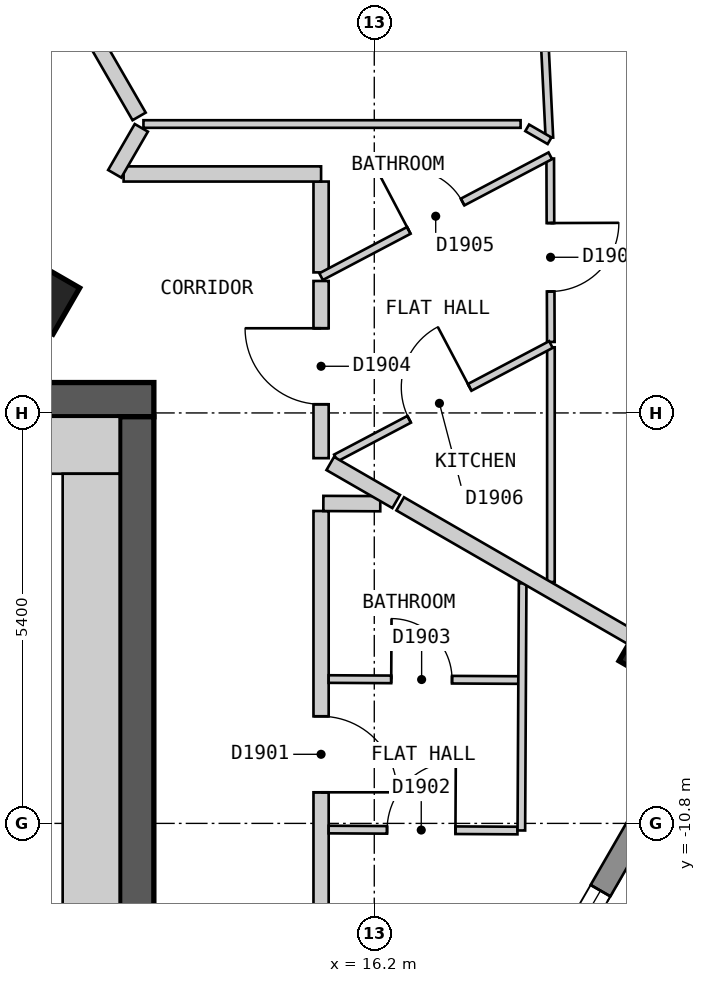
"""IFC4 building model, lengths in metres.
Left out: names, types, materials, properties, quantities, classifications, styles, units other than length and angle.
Written with IfcOpenShell. Run it as: python <this file> out.ifc"""

import sys

from ifc_helpers import new_model, si_unit, direction, frame, frame_2d, origin, origin_2d, place, context, subcontext, project, spatial, polyline, rectangle, outline, extrude, element, fill, save


model = new_model("IFC4")
c1 = context("Model", 3, precision=1e-05, world=origin(), true_north=direction((0.0, 1.0)))
c2 = subcontext(c1, "Body", "Model", "MODEL_VIEW")
j1 = project(units=[si_unit("LENGTHUNIT", "METRE"), si_unit("PLANEANGLEUNIT", "RADIAN")], contexts=[c1])
p1 = place(None, origin())
s1 = spatial("IfcSite", under=j1, at=p1, CompositionType="ELEMENT")
p2 = place(p1, origin())
s2 = spatial("IfcBuilding", under=s1, at=p2, CompositionType="ELEMENT")
p3 = place(p2, frame((0.0, 0.0, 226.8)))
s3 = spatial("IfcBuildingStorey", under=s2, at=p3, CompositionType="ELEMENT", Elevation=226.8)
for number, where, z_axis, x_axis in (
    (1, (19.899, -8.534, 0.0), (0.0, 0.0, 1.0), (0.5, 0.866, 0.0)),
    (2, (11.845, -3.884, 0.0), (0.0, 0.0, 1.0), (0.5, 0.866, 0.0)),
):
    element("IfcColumn", number, at=place(p3, frame(where, z_axis=z_axis, x_axis=x_axis)), inside=s3, PredefinedType="COLUMN", context=c2, shape_type="SweptSolid", body=[
        extrude(rectangle(XDim=0.7, YDim=0.7, at=origin_2d()), origin(), (0.0, 0.0, 1.0), 3.0),
    ])
p4 = place(p3, frame((-13.3, -5.225, 0.0), z_axis=(0.0, 0.0, 1.0), x_axis=(1.0, 0.0, 0.0)))
e3 = element("IfcWall", 3, at=p4, inside=s3, PredefinedType="SHEAR", context=c2, shape_type="SweptSolid", body=[
    extrude(rectangle(XDim=26.6, YDim=0.45, at=frame_2d((13.3, 0.0))), origin(), (0.0, 0.0, 1.0), 2.7),
])
p5 = place(p4, frame((23.65, 0.0, 0.0)))
e4 = element("IfcOpeningElement", 4, at=p5, cuts=e3, PredefinedType="OPENING", context=c2, shape_type="SweptSolid", body=[
    extrude(rectangle(XDim=1.2, YDim=2.1, at=frame_2d((0.6, 1.05))), frame((0.0, 0.235, 0.0), z_axis=(0.0, -1.0, 0.0), x_axis=(1.0, 0.0, 0.0)), (0.0, 0.0, 1.0), 0.47),
])
p6 = place(p3, frame((13.075, -18.55, 0.0), z_axis=(0.0, 0.0, 1.0), x_axis=(0.0, 1.0, 0.0)))
e5 = element("IfcWall", 5, at=p6, inside=s3, PredefinedType="SHEAR", context=c2, shape_type="SweptSolid", body=[
    extrude(rectangle(XDim=13.1, YDim=0.45, at=frame_2d((6.55, 0.0))), origin(), (0.0, 0.0, 1.0), 2.7),
])
p7 = place(p3, frame((15.285, -18.425, 0.0), z_axis=(0.0, 0.0, 1.0), x_axis=(0.500012653391, 0.866018098222, 0.0)))
e6 = element("IfcWall", 6, at=p7, inside=s3, PredefinedType="SOLIDWALL", context=c2, shape_type="SweptSolid", body=[
    extrude(outline(polyline([(0.0, -0.15), (16.628, -0.15), (16.548, 0.15), (0.08, 0.15), (0.0, -0.15)])), origin(), (0.0, 0.0, 1.0), 2.7),
])
p8 = place(p7, frame((1.165, 0.0, 0.15)))
e7 = element("IfcOpeningElement", 7, at=p8, cuts=e6, PredefinedType="OPENING", context=c2, shape_type="SweptSolid", body=[
    extrude(rectangle(XDim=1.5, YDim=2.1, at=frame_2d((0.75, 1.05))), frame((0.0, 0.16, 0.0), z_axis=(0.0, -1.0, 0.0), x_axis=(1.0, 0.0, 0.0)), (0.0, 0.0, 1.0), 0.32),
])
p9 = place(p7, frame((3.724, 0.0, 0.15)))
e8 = element("IfcOpeningElement", 8, at=p9, cuts=e6, PredefinedType="OPENING", context=c2, shape_type="SweptSolid", body=[
    extrude(rectangle(XDim=1.5, YDim=2.1, at=frame_2d((0.75, 1.05))), frame((0.0, 0.16, 0.0), z_axis=(0.0, -1.0, 0.0), x_axis=(1.0, 0.0, 0.0)), (0.0, 0.0, 1.0), 0.32),
])
p10 = place(p7, frame((6.283, 0.0, 0.15)))
e9 = element("IfcOpeningElement", 9, at=p10, cuts=e6, PredefinedType="OPENING", context=c2, shape_type="SweptSolid", body=[
    extrude(rectangle(XDim=1.5, YDim=2.1, at=frame_2d((0.75, 1.05))), frame((0.0, 0.16, 0.0), z_axis=(0.0, -1.0, 0.0), x_axis=(1.0, 0.0, 0.0)), (0.0, 0.0, 1.0), 0.32),
])
p11 = place(p7, frame((8.843, 0.0, 0.15)))
e10 = element("IfcOpeningElement", 10, at=p11, cuts=e6, PredefinedType="OPENING", context=c2, shape_type="SweptSolid", body=[
    extrude(rectangle(XDim=1.5, YDim=2.1, at=frame_2d((0.75, 1.05))), frame((0.0, 0.16, 0.0), z_axis=(0.0, -1.0, 0.0), x_axis=(1.0, 0.0, 0.0)), (0.0, 0.0, 1.0), 0.32),
])
p12 = place(p7, frame((11.402, 0.0, 0.15)))
e11 = element("IfcOpeningElement", 11, at=p12, cuts=e6, PredefinedType="OPENING", context=c2, shape_type="SweptSolid", body=[
    extrude(rectangle(XDim=1.5, YDim=2.1, at=frame_2d((0.75, 1.05))), frame((0.0, 0.16, 0.0), z_axis=(0.0, -1.0, 0.0), x_axis=(1.0, 0.0, 0.0)), (0.0, 0.0, 1.0), 0.32),
])
p13 = place(p7, frame((13.962, 0.0, 0.15)))
e12 = element("IfcOpeningElement", 12, at=p13, cuts=e6, PredefinedType="OPENING", context=c2, shape_type="SweptSolid", body=[
    extrude(rectangle(XDim=1.5, YDim=2.1, at=frame_2d((0.75, 1.05))), frame((0.0, 0.16, 0.0), z_axis=(0.0, -1.0, 0.0), x_axis=(1.0, 0.0, 0.0)), (0.0, 0.0, 1.0), 0.32),
])
p14 = place(p3, frame((9.238, 5.2, 0.0), z_axis=(0.0, 0.0, 1.0), x_axis=(0.500025705601, -0.86601056214, 0.0)))
e13 = element("IfcWall", 13, at=p14, inside=s3, PredefinedType="PARTITIONING", context=c2, shape_type="SweptSolid", body=[
    extrude(rectangle(XDim=7.735, YDim=0.2, at=frame_2d((3.868, 0.0))), origin(), (0.0, 0.0, 1.0), 2.7),
])
p15 = place(p3, frame((15.5, -2.356, 0.0), z_axis=(0.0, 0.0, 1.0), x_axis=(0.0, -1.0, 0.0)))
e14 = element("IfcWall", 14, at=p15, inside=s3, PredefinedType="PARTITIONING", context=c2, shape_type="SweptSolid", body=[
    extrude(rectangle(XDim=1.195, YDim=0.2, at=frame_2d((0.598, 0.0))), origin(), (0.0, 0.0, 1.0), 2.7),
])
p16 = place(p3, frame((12.902, -2.256, 0.0), z_axis=(0.0, 0.0, 1.0), x_axis=(1.0, 0.0, 0.0)))
e15 = element("IfcWall", 15, at=p16, inside=s3, PredefinedType="PARTITIONING", context=c2, shape_type="SweptSolid", body=[
    extrude(rectangle(XDim=2.598, YDim=0.2, at=frame_2d((1.299, 0.0))), origin(), (0.0, 0.0, 1.0), 2.7),
])
p17 = place(p3, frame((12.785, -2.254, 0.0), z_axis=(0.0, 0.0, 1.0), x_axis=(0.500871040665, 0.865521923826, 0.0)))
e16 = element("IfcWall", 16, at=p17, inside=s3, PredefinedType="PARTITIONING", context=c2, shape_type="SweptSolid", body=[
    extrude(rectangle(XDim=0.699, YDim=0.2, at=frame_2d((0.35, 0.0))), origin(), (0.0, 0.0, 1.0), 2.7),
])
p18 = place(p3, frame((15.5, -17.752, 0.0), z_axis=(0.0, 0.0, 1.0), x_axis=(0.0, 1.0, 0.0)))
e17 = element("IfcWall", 17, at=p18, inside=s3, PredefinedType="PARTITIONING", context=c2, shape_type="SweptSolid", body=[
    extrude(rectangle(XDim=11.062, YDim=0.2, at=frame_2d((5.531, 0.0))), origin(), (0.0, 0.0, 1.0), 2.7),
])
p19 = place(p18, frame((7.361, 0.0, 0.0)))
e18 = element("IfcOpeningElement", 18, at=p19, cuts=e17, PredefinedType="OPENING", context=c2, shape_type="SweptSolid", body=[
    extrude(rectangle(XDim=1.0, YDim=2.1, at=frame_2d((0.5, 1.05))), frame((0.0, 0.11, 0.0), z_axis=(0.0, -1.0, 0.0), x_axis=(1.0, 0.0, 0.0)), (0.0, 0.0, 1.0), 0.22),
])
p20 = place(p3, frame((15.5, -5.995, 0.0), z_axis=(0.0, 0.0, 1.0), x_axis=(0.0, 1.0, 0.0)))
e19 = element("IfcWall", 19, at=p20, inside=s3, PredefinedType="PARTITIONING", context=c2, shape_type="SweptSolid", body=[
    extrude(rectangle(XDim=2.331, YDim=0.2, at=frame_2d((1.166, 0.0))), origin(), (0.0, 0.0, 1.0), 2.7),
])
p21 = place(p20, frame((0.709, 0.0, 0.0)))
e20 = element("IfcOpeningElement", 20, at=p21, cuts=e19, PredefinedType="OPENING", context=c2, shape_type="SweptSolid", body=[
    extrude(rectangle(XDim=1.0, YDim=2.1, at=frame_2d((0.5, 1.05))), frame((0.0, 0.11, 0.0), z_axis=(0.0, -1.0, 0.0), x_axis=(1.0, 0.0, 0.0)), (0.0, 0.0, 1.0), 0.22),
])
p22 = place(p3, frame((15.6, -8.901, 0.0), z_axis=(0.0, 0.0, 1.0), x_axis=(0.999986038514, -0.005284200615, 0.0)))
e21 = element("IfcWall", 21, at=p22, inside=s3, PredefinedType="PARTITIONING", context=c2, shape_type="SweptSolid", body=[
    extrude(rectangle(XDim=2.495, YDim=0.1, at=frame_2d((1.248, 0.0))), origin(), (0.0, 0.0, 1.0), 2.7),
])
p23 = place(p22, frame((0.823, 0.0, 0.0)))
e22 = element("IfcOpeningElement", 22, at=p23, cuts=e21, PredefinedType="OPENING", context=c2, shape_type="SweptSolid", body=[
    extrude(rectangle(XDim=0.8, YDim=2.1, at=frame_2d((0.4, 1.05))), frame((0.0, 0.06, 0.0), z_axis=(0.0, -1.0, 0.0), x_axis=(1.0, 0.0, 0.0)), (0.0, 0.0, 1.0), 0.12),
])
p24 = place(p3, frame((15.6, -10.881, 0.0), z_axis=(0.0, 0.0, 1.0), x_axis=(0.999986431575, -0.005209286502, 0.0)))
e23 = element("IfcWall", 23, at=p24, inside=s3, PredefinedType="PARTITIONING", context=c2, shape_type="SweptSolid", body=[
    extrude(rectangle(XDim=2.484, YDim=0.1, at=frame_2d((1.242, 0.0))), origin(), (0.0, 0.0, 1.0), 2.7),
])
p25 = place(p24, frame((0.768, 0.0, 0.0)))
e24 = element("IfcOpeningElement", 24, at=p25, cuts=e23, PredefinedType="OPENING", context=c2, shape_type="SweptSolid", body=[
    extrude(rectangle(XDim=0.9, YDim=2.1, at=frame_2d((0.45, 1.05))), frame((0.0, 0.06, 0.0), z_axis=(0.0, -1.0, 0.0), x_axis=(1.0, 0.0, 0.0)), (0.0, 0.0, 1.0), 0.12),
])
p26 = place(p3, frame((18.388, 0.579, 0.0), z_axis=(0.0, 0.0, 1.0), x_axis=(0.049097293833, -0.998794000652, 0.0)))
e25 = element("IfcWall", 25, at=p26, inside=s3, PredefinedType="PARTITIONING", context=c2, shape_type="SweptSolid", body=[
    extrude(rectangle(XDim=2.362, YDim=0.1, at=frame_2d((1.181, 0.0))), origin(), (0.0, 0.0, 1.0), 2.7),
])
p27 = place(p3, frame((18.515, -2.053, 0.0), z_axis=(0.0, 0.0, 1.0), x_axis=(0.003338710651, -0.99999442649, 0.0)))
e26 = element("IfcWall", 26, at=p27, inside=s3, PredefinedType="PARTITIONING", context=c2, shape_type="SweptSolid", body=[
    extrude(rectangle(XDim=2.413, YDim=0.1, at=frame_2d((1.207, 0.0))), origin(), (0.0, 0.0, 1.0), 2.7),
])
p28 = place(p27, frame((0.849, 0.0, 0.0)))
e27 = element("IfcOpeningElement", 27, at=p28, cuts=e26, PredefinedType="OPENING", context=c2, shape_type="SweptSolid", body=[
    extrude(rectangle(XDim=0.9, YDim=2.1, at=frame_2d((0.45, 1.05))), frame((0.0, 0.06, 0.0), z_axis=(0.0, -1.0, 0.0), x_axis=(1.0, 0.0, 0.0)), (0.0, 0.0, 1.0), 0.12),
])
p29 = place(p3, frame((18.212, -1.649, 0.0), z_axis=(0.0, 0.0, 1.0), x_axis=(0.865622947871, -0.500696427109, 0.0)))
e28 = element("IfcWall", 28, at=p29, inside=s3, PredefinedType="PARTITIONING", context=c2, shape_type="SweptSolid", body=[
    extrude(rectangle(XDim=0.34, YDim=0.1, at=frame_2d((0.17, 0.0))), origin(), (0.0, 0.0, 1.0), 2.7),
])
p30 = place(p3, frame((13.163, -1.599, 0.0), z_axis=(0.0, 0.0, 1.0), x_axis=(1.0, 0.0, 0.0)))
e29 = element("IfcWall", 29, at=p30, inside=s3, PredefinedType="PARTITIONING", context=c2, shape_type="SweptSolid", body=[
    extrude(rectangle(XDim=4.962, YDim=0.1, at=frame_2d((2.481, 0.0))), origin(), (0.0, 0.0, 1.0), 2.7),
])
p31 = place(p3, frame((18.135, -10.893, 0.0), z_axis=(0.0, 0.0, 1.0), x_axis=(0.005255182688, 0.999986191432, 0.0)))
e30 = element("IfcWall", 30, at=p31, inside=s3, PredefinedType="PARTITIONING", context=c2, shape_type="SweptSolid", body=[
    extrude(rectangle(XDim=3.252, YDim=0.1, at=frame_2d((1.626, 0.0))), origin(), (0.0, 0.0, 1.0), 2.7),
])
p32 = place(p3, frame((18.524, -7.625, 0.0), z_axis=(0.0, 0.0, 1.0), x_axis=(0.0, 1.0, 0.0)))
e31 = element("IfcWall", 31, at=p32, inside=s3, PredefinedType="PARTITIONING", context=c2, shape_type="SweptSolid", body=[
    extrude(rectangle(XDim=3.089, YDim=0.1, at=frame_2d((1.544, 0.0))), origin(), (0.0, 0.0, 1.0), 2.7),
])
p33 = place(p3, frame((15.5, -3.607, 0.0), z_axis=(0.0, 0.0, 1.0), x_axis=(0.884626030835, 0.466301174745, 0.0)))
e32 = element("IfcWall", 32, at=p33, inside=s3, PredefinedType="PARTITIONING", context=c2, shape_type="SweptSolid", body=[
    extrude(rectangle(XDim=3.409, YDim=0.1, at=frame_2d((1.705, 0.0))), origin(), (0.0, 0.0, 1.0), 2.7),
])
p34 = place(p33, frame((1.305, 0.0, 0.0)))
e33 = element("IfcOpeningElement", 33, at=p34, cuts=e32, PredefinedType="OPENING", context=c2, shape_type="SweptSolid", body=[
    extrude(rectangle(XDim=0.8, YDim=2.1, at=frame_2d((0.4, 1.05))), frame((0.0, 0.06, 0.0), z_axis=(0.0, -1.0, 0.0), x_axis=(1.0, 0.0, 0.0)), (0.0, 0.0, 1.0), 0.12),
])
p35 = place(p3, frame((15.695, -5.992, 0.0), z_axis=(0.0, 0.0, 1.0), x_axis=(0.884522140369, 0.466498213498, 0.0)))
e34 = element("IfcWall", 34, at=p35, inside=s3, PredefinedType="PARTITIONING", context=c2, shape_type="SweptSolid", body=[
    extrude(rectangle(XDim=3.198, YDim=0.1, at=frame_2d((1.599, 0.0))), origin(), (0.0, 0.0, 1.0), 2.7),
])
p36 = place(p35, frame((1.09, 0.0, 0.0)))
e35 = element("IfcOpeningElement", 35, at=p36, cuts=e34, PredefinedType="OPENING", context=c2, shape_type="SweptSolid", body=[
    extrude(rectangle(XDim=0.9, YDim=2.1, at=frame_2d((0.45, 1.05))), frame((0.0, 0.06, 0.0), z_axis=(0.0, -1.0, 0.0), x_axis=(1.0, 0.0, 0.0)), (0.0, 0.0, 1.0), 0.12),
])
p37 = place(p3, frame((15.53, -6.591, 0.0), z_axis=(0.0, 0.0, 1.0), x_axis=(0.999992350786, -0.003911312976, 0.0)))
e36 = element("IfcWall", 36, at=p37, inside=s3, PredefinedType="PARTITIONING", context=c2, shape_type="SweptSolid", body=[
    extrude(rectangle(XDim=0.749, YDim=0.2, at=frame_2d((0.375, 0.0))), origin(), (0.0, 0.0, 1.0), 2.7),
])
p38 = place(p3, frame((15.621, -6.065, 0.0), z_axis=(0.0, 0.0, 1.0), x_axis=(0.866254619292, -0.49960277677, 0.0)))
e37 = element("IfcWall", 37, at=p38, inside=s3, PredefinedType="PARTITIONING", context=c2, shape_type="SweptSolid", body=[
    extrude(rectangle(XDim=1.001, YDim=0.2, at=frame_2d((0.5, 0.0))), origin(), (0.0, 0.0, 1.0), 2.7),
])
p39 = place(p3, frame((16.541, -6.596, 0.0), z_axis=(0.0, 0.0, 1.0), x_axis=(0.866040404911, -0.499974016386, 0.0)))
e38 = element("IfcWall", 38, at=p39, inside=s3, PredefinedType="PARTITIONING", context=c2, shape_type="SweptSolid", body=[
    extrude(rectangle(XDim=4.677, YDim=0.2, at=frame_2d((2.338, 0.0))), origin(), (0.0, 0.0, 1.0), 2.7),
])
p40 = place(p3, frame((11.55, -5.825, 0.0), z_axis=(0.0, 0.0, 1.0), x_axis=(1.0, 0.0, 0.0)))
e39 = element("IfcWall", 39, at=p40, inside=s3, PredefinedType="PARTITIONING", context=c2, shape_type="SweptSolid", body=[
    extrude(rectangle(XDim=1.3, YDim=0.75, at=frame_2d((0.65, 0.0))), origin(), (0.0, 0.0, 1.0), 2.7),
])
p41 = place(p3, frame((12.475, -14.45, 0.0), z_axis=(0.0, 0.0, 1.0), x_axis=(0.0, 1.0, 0.0)))
e40 = element("IfcWall", 40, at=p41, inside=s3, PredefinedType="PARTITIONING", context=c2, shape_type="SweptSolid", body=[
    extrude(rectangle(XDim=8.25, YDim=0.75, at=frame_2d((4.125, 0.0))), origin(), (0.0, 0.0, 1.0), 2.7),
])
p42 = place(p10, origin())
e41 = element("IfcWindow", 41, at=p42, inside=s3, PartitioningType="SINGLE_PANEL", PredefinedType="WINDOW", context=c2, shape_type="SweptSolid", body=[
    extrude(rectangle(XDim=1.5, YDim=2.1, at=frame_2d((0.75, 1.05))), frame((0.0, 0.03, 0.0), z_axis=(0.0, -1.0, 0.0), x_axis=(1.0, 0.0, 0.0)), (0.0, 0.0, 1.0), 0.06),
])
fill(e9, e41)
p43 = place(p19, origin())
e42 = element("IfcDoor", 42, at=p43, inside=s3, OperationType="SINGLE_SWING_LEFT", PredefinedType="DOOR", context=c2, shape_type="SweptSolid", body=[
    extrude(rectangle(XDim=1.0, YDim=2.1, at=frame_2d((0.5, 1.05))), frame((0.0, 0.025, 0.0), z_axis=(0.0, -1.0, 0.0), x_axis=(1.0, 0.0, 0.0)), (0.0, 0.0, 1.0), 0.05),
])
fill(e18, e42)
p44 = place(p25, origin())
e43 = element("IfcDoor", 43, at=p44, inside=s3, OperationType="SINGLE_SWING_RIGHT", PredefinedType="DOOR", context=c2, shape_type="SweptSolid", body=[
    extrude(rectangle(XDim=0.9, YDim=2.1, at=frame_2d((0.45, 1.05))), frame((0.0, 0.025, 0.0), z_axis=(0.0, -1.0, 0.0), x_axis=(1.0, 0.0, 0.0)), (0.0, 0.0, 1.0), 0.05),
])
fill(e24, e43)
p45 = place(p23, origin())
e44 = element("IfcDoor", 44, at=p45, inside=s3, OperationType="SINGLE_SWING_LEFT", PredefinedType="DOOR", context=c2, shape_type="SweptSolid", body=[
    extrude(rectangle(XDim=0.8, YDim=2.1, at=frame_2d((0.4, 1.05))), frame((0.0, 0.025, 0.0), z_axis=(0.0, -1.0, 0.0), x_axis=(1.0, 0.0, 0.0)), (0.0, 0.0, 1.0), 0.05),
])
fill(e22, e44)
p46 = place(p21, origin())
e45 = element("IfcDoor", 45, at=p46, inside=s3, OperationType="SINGLE_SWING_RIGHT", PredefinedType="DOOR", context=c2, shape_type="SweptSolid", body=[
    extrude(rectangle(XDim=1.0, YDim=2.1, at=frame_2d((0.5, 1.05))), frame((0.0, 0.025, 0.0), z_axis=(0.0, -1.0, 0.0), x_axis=(1.0, 0.0, 0.0)), (0.0, 0.0, 1.0), 0.05),
])
fill(e20, e45)
p47 = place(p34, origin())
e46 = element("IfcDoor", 46, at=p47, inside=s3, OperationType="SINGLE_SWING_LEFT", PredefinedType="DOOR", context=c2, shape_type="SweptSolid", body=[
    extrude(rectangle(XDim=0.8, YDim=2.1, at=frame_2d((0.4, 1.05))), frame((0.0, 0.025, 0.0), z_axis=(0.0, -1.0, 0.0), x_axis=(1.0, 0.0, 0.0)), (0.0, 0.0, 1.0), 0.05),
])
fill(e33, e46)
p48 = place(p36, origin())
e47 = element("IfcDoor", 47, at=p48, inside=s3, OperationType="SINGLE_SWING_RIGHT", PredefinedType="DOOR", context=c2, shape_type="SweptSolid", body=[
    extrude(rectangle(XDim=0.9, YDim=2.1, at=frame_2d((0.45, 1.05))), frame((0.0, 0.025, 0.0), z_axis=(0.0, -1.0, 0.0), x_axis=(1.0, 0.0, 0.0)), (0.0, 0.0, 1.0), 0.05),
])
fill(e35, e47)
p49 = place(p28, origin())
e48 = element("IfcDoor", 48, at=p49, inside=s3, OperationType="SINGLE_SWING_LEFT", PredefinedType="DOOR", context=c2, shape_type="SweptSolid", body=[
    extrude(rectangle(XDim=0.9, YDim=2.1, at=frame_2d((0.45, 1.05))), frame((0.0, 0.025, 0.0), z_axis=(0.0, -1.0, 0.0), x_axis=(1.0, 0.0, 0.0)), (0.0, 0.0, 1.0), 0.05),
])
fill(e27, e48)
save(model, sys.argv[1])
